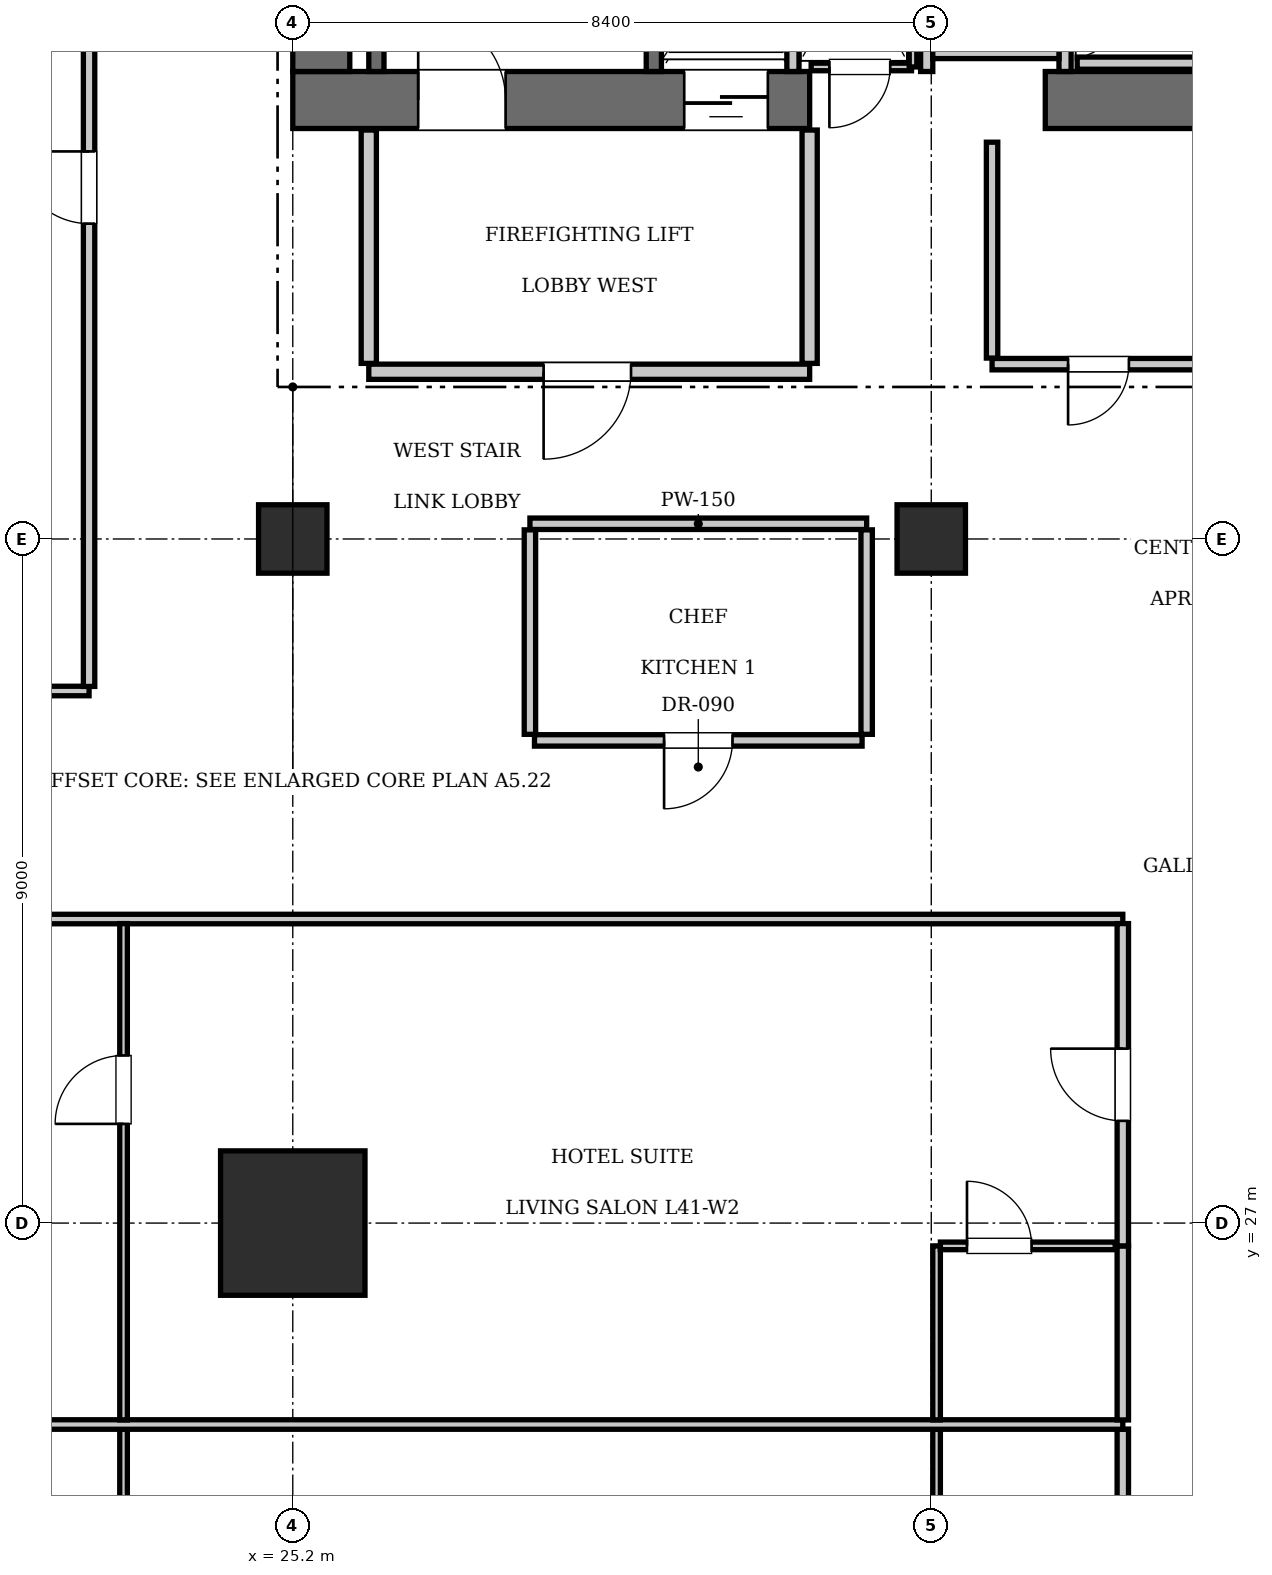
"""IFC4 building model, lengths in metres.
Left out: names, types, materials, properties, quantities, classifications, styles, units other than length and angle.
Written with IfcOpenShell. Run it as: python <this file> out.ifc"""

import sys

from ifc_helpers import new_model, si_unit, direction, frame, frame_2d, origin, origin_2d, place, context, subcontext, project, spatial, rectangle, extrude, element, fill, save


model = new_model("IFC4")
c1 = context("Model", 3, precision=1e-05, world=origin(), true_north=direction((0.0, 1.0)))
c2 = subcontext(c1, "Body", "Model", "MODEL_VIEW")
j1 = project(units=[si_unit("LENGTHUNIT", "METRE"), si_unit("PLANEANGLEUNIT", "RADIAN")], contexts=[c1])
p1 = place(None, origin())
s1 = spatial("IfcSite", under=j1, at=p1, CompositionType="ELEMENT")
p2 = place(p1, origin())
s2 = spatial("IfcBuilding", under=s1, at=p2, CompositionType="ELEMENT")
p3 = place(p2, frame((0.0, 0.0, 169.75)))
s3 = spatial("IfcBuildingStorey", under=s2, at=p3, CompositionType="ELEMENT", Elevation=169.75)
p4 = place(p3, frame((25.2, 27.0, 0.0), z_axis=(0.0, 0.0, 1.0), x_axis=(1.0, 0.0, 0.0)))
e1 = element("IfcColumn", 1, at=p4, inside=s3, PredefinedType="COLUMN", context=c2, shape_type="SweptSolid", body=[
    extrude(rectangle(XDim=1.9, YDim=1.9, at=origin_2d()), origin(), (0.0, 0.0, 1.0), 3.85),
])
p5 = place(p3, frame((25.2, 41.775, 0.0), z_axis=(0.0, 0.0, 1.0), x_axis=(1.0, 0.0, 0.0)))
e2 = element("IfcWall", 2, at=p5, inside=s3, PredefinedType="SHEAR", context=c2, shape_type="SweptSolid", body=[
    extrude(rectangle(XDim=6.8, YDim=0.75, at=frame_2d((3.4, 0.0))), origin(), (0.0, 0.0, 1.0), 3.85),
])
p6 = place(p5, frame((1.65, 0.0, 0.0)))
e3 = element("IfcOpeningElement", 3, at=p6, cuts=e2, PredefinedType="OPENING", context=c2, shape_type="SweptSolid", body=[
    extrude(rectangle(XDim=1.15, YDim=2.15, at=frame_2d((0.575, 1.075))), frame((0.0, 0.385, 0.0), z_axis=(0.0, -1.0, 0.0), x_axis=(1.0, 0.0, 0.0)), (0.0, 0.0, 1.0), 0.77),
])
p7 = place(p5, frame((5.15, 0.0, 0.0)))
e4 = element("IfcOpeningElement", 4, at=p7, cuts=e2, PredefinedType="OPENING", context=c2, shape_type="SweptSolid", body=[
    extrude(rectangle(XDim=1.1, YDim=2.2, at=frame_2d((0.55, 1.1))), frame((0.0, 0.385, 0.0), z_axis=(0.0, -1.0, 0.0), x_axis=(1.0, 0.0, 0.0)), (0.0, 0.0, 1.0), 0.77),
])
p8 = place(p3, frame((35.1, 41.775, 0.0), z_axis=(0.0, 0.0, 1.0), x_axis=(1.0, 0.0, 0.0)))
e5 = element("IfcWall", 5, at=p8, inside=s3, PredefinedType="SHEAR", context=c2, shape_type="SweptSolid", body=[
    extrude(rectangle(XDim=5.4, YDim=0.75, at=frame_2d((2.7, 0.0))), origin(), (0.0, 0.0, 1.0), 3.85),
])
p9 = place(p3, frame((25.575, 42.15, 0.0), z_axis=(0.0, 0.0, 1.0), x_axis=(0.0, 1.0, 0.0)))
e6 = element("IfcWall", 6, at=p9, inside=s3, PredefinedType="SHEAR", context=c2, shape_type="SweptSolid", body=[
    extrude(rectangle(XDim=1.9, YDim=0.75, at=frame_2d((0.95, 0.0))), origin(), (0.0, 0.0, 1.0), 3.85),
])
for number, where, z_axis, x_axis in (
    (7, (25.2, 36.0, 0.0), (0.0, 0.0, 1.0), (1.0, 0.0, 0.0)),
    (8, (33.6, 36.0, 0.0), (0.0, 0.0, 1.0), (1.0, 0.0, 0.0)),
):
    element("IfcColumn", number, at=place(p3, frame(where, z_axis=z_axis, x_axis=x_axis)), inside=s3, PredefinedType="COLUMN", context=c2, shape_type="SweptSolid", body=[
        extrude(rectangle(XDim=0.9, YDim=0.9, at=origin_2d()), origin(), (0.0, 0.0, 1.0), 3.85),
    ])
p10 = place(p3, frame((29.95, 42.15, 0.0), z_axis=(0.0, 0.0, 1.0), x_axis=(0.0, 1.0, 0.0)))
e9 = element("IfcWall", 9, at=p10, inside=s3, PredefinedType="SOLIDWALL", context=c2, shape_type="SweptSolid", body=[
    extrude(rectangle(XDim=9.0, YDim=0.2, at=frame_2d((4.5, 0.0))), origin(), (0.0, 0.0, 1.0), 3.61),
])
p11 = place(p3, frame((26.3, 42.15, 0.0), z_axis=(0.0, 0.0, 1.0), x_axis=(0.0, 1.0, 0.0)))
e10 = element("IfcWall", 10, at=p11, inside=s3, PredefinedType="SOLIDWALL", context=c2, shape_type="SweptSolid", body=[
    extrude(rectangle(XDim=1.87, YDim=0.2, at=frame_2d((0.935, 0.0))), origin(), (0.0, 0.0, 1.0), 3.61),
])
p12 = place(p3, frame((31.78, 42.15, 0.0), z_axis=(0.0, 0.0, 1.0), x_axis=(0.0, 1.0, 0.0)))
e11 = element("IfcWall", 11, at=p12, inside=s3, PredefinedType="SOLIDWALL", context=c2, shape_type="SweptSolid", body=[
    extrude(rectangle(XDim=2.59, YDim=0.16, at=frame_2d((1.295, 0.0))), origin(), (0.0, 0.0, 1.0), 3.61),
])
p13 = place(p3, frame((35.52, 42.26, 0.0), z_axis=(0.0, 0.0, 1.0), x_axis=(1.0, 0.0, 0.0)))
e12 = element("IfcWall", 12, at=p13, inside=s3, PredefinedType="SOLIDWALL", context=c2, shape_type="SweptSolid", body=[
    extrude(rectangle(XDim=5.02, YDim=0.16, at=frame_2d((2.51, 0.0))), origin(), (0.0, 0.0, 1.0), 3.61),
])
for number, where, z_axis, x_axis in (
    (13, (33.54, 42.15, 0.0), (0.0, 0.0, 1.0), (0.0, 1.0, 0.0)),
    (14, (35.36, 42.15, 0.0), (0.0, 0.0, 1.0), (0.0, 1.0, 0.0)),
):
    element("IfcWall", number, at=place(p3, frame(where, z_axis=z_axis, x_axis=x_axis)), inside=s3, PredefinedType="SOLIDWALL", context=c2, shape_type="SweptSolid", body=[
        extrude(rectangle(XDim=2.25, YDim=0.16, at=frame_2d((1.125, 0.0))), origin(), (0.0, 0.0, 1.0), 3.61),
    ])
p14 = place(p3, frame((33.62, 42.4, 0.0), z_axis=(0.0, 0.0, 1.0), x_axis=(1.0, 0.0, 0.0)))
e15 = element("IfcWall", 15, at=p14, inside=s3, PredefinedType="SOLIDWALL", context=c2, shape_type="SweptSolid", body=[
    extrude(rectangle(XDim=1.66, YDim=0.16, at=frame_2d((0.83, 0.0))), origin(), (0.0, 0.0, 1.0), 3.61),
])
p15 = place(p3, frame((26.2, 38.2, 0.0), z_axis=(0.0, 0.0, 1.0), x_axis=(1.0, 0.0, 0.0)))
e16 = element("IfcWall", 16, at=p15, inside=s3, PredefinedType="PARTITIONING", context=c2, shape_type="SweptSolid", body=[
    extrude(rectangle(XDim=5.8, YDim=0.2, at=frame_2d((2.9, 0.0))), origin(), (0.0, 0.0, 1.0), 3.61),
])
p16 = place(p15, frame((2.3, 0.0, 0.0)))
e17 = element("IfcOpeningElement", 17, at=p16, cuts=e16, PredefinedType="OPENING", context=c2, shape_type="SweptSolid", body=[
    extrude(rectangle(XDim=1.15, YDim=2.15, at=frame_2d((0.575, 1.075))), frame((0.0, 0.11, 0.0), z_axis=(0.0, -1.0, 0.0), x_axis=(1.0, 0.0, 0.0)), (0.0, 0.0, 1.0), 0.22),
])
for number, where, z_axis, x_axis in (
    (18, (26.2, 38.31, 0.0), (0.0, 0.0, 1.0), (0.0, 1.0, 0.0)),
    (19, (32.0, 38.31, 0.0), (0.0, 0.0, 1.0), (0.0, 1.0, 0.0)),
):
    element("IfcWall", number, at=place(p3, frame(where, z_axis=z_axis, x_axis=x_axis)), inside=s3, PredefinedType="PARTITIONING", context=c2, shape_type="SweptSolid", body=[
        extrude(rectangle(XDim=3.07, YDim=0.2, at=frame_2d((1.535, 0.0))), origin(), (0.0, 0.0, 1.0), 3.61),
    ])
p17 = place(p3, frame((32.02, 42.21, 0.0), z_axis=(0.0, 0.0, 1.0), x_axis=(1.0, 0.0, 0.0)))
e20 = element("IfcWall", 20, at=p17, inside=s3, PredefinedType="PARTITIONING", context=c2, shape_type="SweptSolid", body=[
    extrude(rectangle(XDim=1.32, YDim=0.1, at=frame_2d((0.66, 0.0))), origin(), (0.0, 0.0, 1.0), 3.61),
])
p18 = place(p17, frame((0.24, 0.0, 0.0)))
e21 = element("IfcOpeningElement", 21, at=p18, cuts=e20, PredefinedType="OPENING", context=c2, shape_type="SweptSolid", body=[
    extrude(rectangle(XDim=0.8, YDim=2.05, at=frame_2d((0.4, 1.025))), frame((0.0, 0.06, 0.0), z_axis=(0.0, -1.0, 0.0), x_axis=(1.0, 0.0, 0.0)), (0.0, 0.0, 1.0), 0.12),
])
p19 = place(p3, frame((33.36, 42.21, 0.0), z_axis=(0.0, 0.0, 1.0), x_axis=(0.0, 1.0, 0.0)))
e22 = element("IfcWall", 22, at=p19, inside=s3, PredefinedType="PARTITIONING", context=c2, shape_type="SweptSolid", body=[
    extrude(rectangle(XDim=2.73, YDim=0.1, at=frame_2d((1.365, 0.0))), origin(), (0.0, 0.0, 1.0), 3.61),
])
p20 = place(p3, frame((34.4, 38.3, 0.0), z_axis=(0.0, 0.0, 1.0), x_axis=(1.0, 0.0, 0.0)))
e23 = element("IfcWall", 23, at=p20, inside=s3, PredefinedType="PARTITIONING", context=c2, shape_type="SweptSolid", body=[
    extrude(rectangle(XDim=2.88, YDim=0.15, at=frame_2d((1.44, 0.0))), origin(), (0.0, 0.0, 1.0), 3.61),
])
p21 = place(p20, frame((1.0, 0.0, 0.0)))
e24 = element("IfcOpeningElement", 24, at=p21, cuts=e23, PredefinedType="OPENING", context=c2, shape_type="SweptSolid", body=[
    extrude(rectangle(XDim=0.8, YDim=2.05, at=frame_2d((0.4, 1.025))), frame((0.0, 0.085, 0.0), z_axis=(0.0, -1.0, 0.0), x_axis=(1.0, 0.0, 0.0)), (0.0, 0.0, 1.0), 0.17),
])
p22 = place(p3, frame((34.4, 38.38, 0.0), z_axis=(0.0, 0.0, 1.0), x_axis=(0.0, 1.0, 0.0)))
e25 = element("IfcWall", 25, at=p22, inside=s3, PredefinedType="PARTITIONING", context=c2, shape_type="SweptSolid", body=[
    extrude(rectangle(XDim=2.84, YDim=0.15, at=frame_2d((1.42, 0.0))), origin(), (0.0, 0.0, 1.0), 3.61),
])
p23 = place(p3, frame((28.32, 36.2, 0.0), z_axis=(0.0, 0.0, 1.0), x_axis=(1.0, 0.0, 0.0)))
e26 = element("IfcWall", 26, at=p23, inside=s3, PredefinedType="PARTITIONING", context=c2, shape_type="SweptSolid", body=[
    extrude(rectangle(XDim=4.43, YDim=0.15, at=frame_2d((2.215, 0.0))), origin(), (0.0, 0.0, 1.0), 3.61),
])
for number, where, z_axis, x_axis in (
    (27, (28.32, 33.43, 0.0), (0.0, 0.0, 1.0), (0.0, 1.0, 0.0)),
    (28, (32.75, 33.43, 0.0), (0.0, 0.0, 1.0), (0.0, 1.0, 0.0)),
):
    element("IfcWall", number, at=place(p3, frame(where, z_axis=z_axis, x_axis=x_axis)), inside=s3, PredefinedType="PARTITIONING", context=c2, shape_type="SweptSolid", body=[
        extrude(rectangle(XDim=2.69, YDim=0.15, at=frame_2d((1.345, 0.0))), origin(), (0.0, 0.0, 1.0), 3.61),
    ])
p24 = place(p3, frame((28.38, 33.35, 0.0), z_axis=(0.0, 0.0, 1.0), x_axis=(1.0, 0.0, 0.0)))
e29 = element("IfcWall", 29, at=p24, inside=s3, PredefinedType="PARTITIONING", context=c2, shape_type="SweptSolid", body=[
    extrude(rectangle(XDim=4.31, YDim=0.15, at=frame_2d((2.155, 0.0))), origin(), (0.0, 0.0, 1.0), 3.61),
])
p25 = place(p24, frame((1.705, 0.0, 0.0)))
e30 = element("IfcOpeningElement", 30, at=p25, cuts=e29, PredefinedType="OPENING", context=c2, shape_type="SweptSolid", body=[
    extrude(rectangle(XDim=0.9, YDim=2.1, at=frame_2d((0.45, 1.05))), frame((0.0, 0.085, 0.0), z_axis=(0.0, -1.0, 0.0), x_axis=(1.0, 0.0, 0.0)), (0.0, 0.0, 1.0), 0.17),
])
p26 = place(p3, frame((13.2, 31.0, 0.0), z_axis=(0.0, 0.0, 1.0), x_axis=(1.0, 0.0, 0.0)))
e31 = element("IfcWall", 31, at=p26, inside=s3, PredefinedType="PARTITIONING", context=c2, shape_type="SweptSolid", body=[
    extrude(rectangle(XDim=22.92, YDim=0.125, at=frame_2d((11.46, 0.0))), origin(), (0.0, 0.0, 1.0), 3.61),
])
p27 = place(p3, frame((36.12, 22.0, 0.0), z_axis=(0.0, 0.0, 1.0), x_axis=(0.0, 1.0, 0.0)))
e32 = element("IfcWall", 32, at=p27, inside=s3, PredefinedType="PARTITIONING", context=c2, shape_type="SweptSolid", body=[
    extrude(rectangle(XDim=2.29, YDim=0.15, at=frame_2d((1.145, 0.0))), origin(), (0.0, 0.0, 1.0), 3.61),
])
p28 = place(p3, frame((33.67, 22.0, 0.0), z_axis=(0.0, 0.0, 1.0), x_axis=(0.0, 1.0, 0.0)))
e33 = element("IfcWall", 33, at=p28, inside=s3, PredefinedType="PARTITIONING", context=c2, shape_type="SweptSolid", body=[
    extrude(rectangle(XDim=2.29, YDim=0.1, at=frame_2d((1.145, 0.0))), origin(), (0.0, 0.0, 1.0), 3.007),
])
p29 = place(p3, frame((22.974, 17.76, 0.0), z_axis=(0.0, 0.0, 1.0), x_axis=(0.0, 1.0, 0.0)))
e34 = element("IfcWall", 34, at=p29, inside=s3, PredefinedType="PARTITIONING", context=c2, shape_type="SweptSolid", body=[
    extrude(rectangle(XDim=6.53, YDim=0.1, at=frame_2d((3.265, 0.0))), origin(), (0.0, 0.0, 1.0), 3.61),
])
p30 = place(p29, frame((2.815, 0.0, 0.0)))
e35 = element("IfcOpeningElement", 35, at=p30, cuts=e34, PredefinedType="OPENING", context=c2, shape_type="SweptSolid", body=[
    extrude(rectangle(XDim=0.9, YDim=2.1, at=frame_2d((0.45, 1.05))), frame((0.0, 0.06, 0.0), z_axis=(0.0, -1.0, 0.0), x_axis=(1.0, 0.0, 0.0)), (0.0, 0.0, 1.0), 0.12),
])
p31 = place(p3, frame((13.2, 24.35, 0.0), z_axis=(0.0, 0.0, 1.0), x_axis=(1.0, 0.0, 0.0)))
e36 = element("IfcWall", 36, at=p31, inside=s3, PredefinedType="PARTITIONING", context=c2, shape_type="SweptSolid", body=[
    extrude(rectangle(XDim=22.92, YDim=0.125, at=frame_2d((11.46, 0.0))), origin(), (0.0, 0.0, 1.0), 3.61),
])
p32 = place(p3, frame((36.12, 24.41, 0.0), z_axis=(0.0, 0.0, 1.0), x_axis=(0.0, 1.0, 0.0)))
e37 = element("IfcWall", 37, at=p32, inside=s3, PredefinedType="PARTITIONING", context=c2, shape_type="SweptSolid", body=[
    extrude(rectangle(XDim=2.29, YDim=0.15, at=frame_2d((1.145, 0.0))), origin(), (0.0, 0.0, 1.0), 3.61),
])
p33 = place(p3, frame((36.12, 26.7, 0.0), z_axis=(0.0, 0.0, 1.0), x_axis=(0.0, 1.0, 0.0)))
e38 = element("IfcWall", 38, at=p33, inside=s3, PredefinedType="PARTITIONING", context=c2, shape_type="SweptSolid", body=[
    extrude(rectangle(XDim=4.24, YDim=0.15, at=frame_2d((2.12, 0.0))), origin(), (0.0, 0.0, 1.0), 3.61),
])
p34 = place(p33, frame((1.645, 0.0, 0.0)))
e39 = element("IfcOpeningElement", 39, at=p34, cuts=e38, PredefinedType="OPENING", context=c2, shape_type="SweptSolid", body=[
    extrude(rectangle(XDim=0.95, YDim=2.15, at=frame_2d((0.475, 1.075))), frame((0.0, 0.085, 0.0), z_axis=(0.0, -1.0, 0.0), x_axis=(1.0, 0.0, 0.0)), (0.0, 0.0, 1.0), 0.17),
])
p35 = place(p3, frame((33.67, 24.41, 0.0), z_axis=(0.0, 0.0, 1.0), x_axis=(0.0, 1.0, 0.0)))
e40 = element("IfcWall", 40, at=p35, inside=s3, PredefinedType="PARTITIONING", context=c2, shape_type="SweptSolid", body=[
    extrude(rectangle(XDim=2.29, YDim=0.1, at=frame_2d((1.145, 0.0))), origin(), (0.0, 0.0, 1.0), 3.007),
])
p36 = place(p3, frame((33.72, 26.7, 0.0), z_axis=(0.0, 0.0, 1.0), x_axis=(1.0, 0.0, 0.0)))
e41 = element("IfcWall", 41, at=p36, inside=s3, PredefinedType="PARTITIONING", context=c2, shape_type="SweptSolid", body=[
    extrude(rectangle(XDim=2.3, YDim=0.1, at=frame_2d((1.15, 0.0))), origin(), (0.0, 0.0, 1.0), 3.61),
])
p37 = place(p36, frame((0.35, 0.0, 0.0)))
e42 = element("IfcOpeningElement", 42, at=p37, cuts=e41, PredefinedType="OPENING", context=c2, shape_type="SweptSolid", body=[
    extrude(rectangle(XDim=0.85, YDim=2.1, at=frame_2d((0.425, 1.05))), frame((0.0, 0.06, 0.0), z_axis=(0.0, -1.0, 0.0), x_axis=(1.0, 0.0, 0.0)), (0.0, 0.0, 1.0), 0.12),
])
p38 = place(p3, frame((22.974, 24.41, 0.0), z_axis=(0.0, 0.0, 1.0), x_axis=(0.0, 1.0, 0.0)))
e43 = element("IfcWall", 43, at=p38, inside=s3, PredefinedType="PARTITIONING", context=c2, shape_type="SweptSolid", body=[
    extrude(rectangle(XDim=6.53, YDim=0.1, at=frame_2d((3.265, 0.0))), origin(), (0.0, 0.0, 1.0), 3.61),
])
p39 = place(p38, frame((3.895, 0.0, 0.0)))
e44 = element("IfcOpeningElement", 44, at=p39, cuts=e43, PredefinedType="OPENING", context=c2, shape_type="SweptSolid", body=[
    extrude(rectangle(XDim=0.9, YDim=2.1, at=frame_2d((0.45, 1.05))), frame((0.0, 0.06, 0.0), z_axis=(0.0, -1.0, 0.0), x_axis=(1.0, 0.0, 0.0)), (0.0, 0.0, 1.0), 0.12),
])
p40 = place(p3, frame((13.2, 34.0, 0.0), z_axis=(0.0, 0.0, 1.0), x_axis=(1.0, 0.0, 0.0)))
e45 = element("IfcWall", 45, at=p40, inside=s3, PredefinedType="PARTITIONING", context=c2, shape_type="SweptSolid", body=[
    extrude(rectangle(XDim=9.32, YDim=0.125, at=frame_2d((4.66, 0.0))), origin(), (0.0, 0.0, 1.0), 3.61),
])
p41 = place(p3, frame((22.52, 34.06, 0.0), z_axis=(0.0, 0.0, 1.0), x_axis=(0.0, 1.0, 0.0)))
e46 = element("IfcWall", 46, at=p41, inside=s3, PredefinedType="PARTITIONING", context=c2, shape_type="SweptSolid", body=[
    extrude(rectangle(XDim=13.127, YDim=0.15, at=frame_2d((6.564, 0.0))), origin(), (0.0, 0.0, 1.0), 3.61),
])
p42 = place(p41, frame((6.089, 0.0, 0.0)))
e47 = element("IfcOpeningElement", 47, at=p42, cuts=e46, PredefinedType="OPENING", context=c2, shape_type="SweptSolid", body=[
    extrude(rectangle(XDim=0.95, YDim=2.15, at=frame_2d((0.475, 1.075))), frame((0.0, 0.085, 0.0), z_axis=(0.0, -1.0, 0.0), x_axis=(1.0, 0.0, 0.0)), (0.0, 0.0, 1.0), 0.17),
])
p43 = place(p6, origin())
e48 = element("IfcDoor", 48, at=p43, inside=s3, OperationType="SINGLE_SWING_LEFT", PredefinedType="DOOR", context=c2, shape_type="SweptSolid", body=[
    extrude(rectangle(XDim=1.15, YDim=2.15, at=frame_2d((0.575, 1.075))), frame((0.0, 0.025, 0.0), z_axis=(0.0, -1.0, 0.0), x_axis=(1.0, 0.0, 0.0)), (0.0, 0.0, 1.0), 0.05),
])
fill(e3, e48)
p44 = place(p7, frame((1.1, 0.0, 0.0), z_axis=(0.0, 0.0, 1.0), x_axis=(-1.0, 0.0, 0.0)))
e49 = element("IfcDoor", 49, at=p44, inside=s3, OperationType="SLIDING_TO_LEFT", PredefinedType="DOOR", context=c2, shape_type="SweptSolid", body=[
    extrude(rectangle(XDim=1.1, YDim=2.2, at=frame_2d((0.55, 1.1))), frame((0.0, 0.025, 0.0), z_axis=(0.0, -1.0, 0.0), x_axis=(1.0, 0.0, 0.0)), (0.0, 0.0, 1.0), 0.05),
])
fill(e4, e49)
p45 = place(p16, frame((1.15, 0.0, 0.0), z_axis=(0.0, 0.0, 1.0), x_axis=(-1.0, 0.0, 0.0)))
e50 = element("IfcDoor", 50, at=p45, inside=s3, OperationType="SINGLE_SWING_RIGHT", PredefinedType="DOOR", context=c2, shape_type="SweptSolid", body=[
    extrude(rectangle(XDim=1.15, YDim=2.15, at=frame_2d((0.575, 1.075))), frame((0.0, 0.025, 0.0), z_axis=(0.0, -1.0, 0.0), x_axis=(1.0, 0.0, 0.0)), (0.0, 0.0, 1.0), 0.05),
])
fill(e17, e50)
p46 = place(p18, frame((0.8, 0.0, 0.0), z_axis=(0.0, 0.0, 1.0), x_axis=(-1.0, 0.0, 0.0)))
e51 = element("IfcDoor", 51, at=p46, inside=s3, OperationType="SINGLE_SWING_RIGHT", PredefinedType="DOOR", context=c2, shape_type="SweptSolid", body=[
    extrude(rectangle(XDim=0.8, YDim=2.05, at=frame_2d((0.4, 1.025))), frame((0.0, 0.025, 0.0), z_axis=(0.0, -1.0, 0.0), x_axis=(1.0, 0.0, 0.0)), (0.0, 0.0, 1.0), 0.05),
])
fill(e21, e51)
p47 = place(p21, frame((0.8, 0.0, 0.0), z_axis=(0.0, 0.0, 1.0), x_axis=(-1.0, 0.0, 0.0)))
e52 = element("IfcDoor", 52, at=p47, inside=s3, OperationType="SINGLE_SWING_RIGHT", PredefinedType="DOOR", context=c2, shape_type="SweptSolid", body=[
    extrude(rectangle(XDim=0.8, YDim=2.05, at=frame_2d((0.4, 1.025))), frame((0.0, 0.025, 0.0), z_axis=(0.0, -1.0, 0.0), x_axis=(1.0, 0.0, 0.0)), (0.0, 0.0, 1.0), 0.05),
])
fill(e24, e52)
p48 = place(p25, frame((0.9, 0.0, 0.0), z_axis=(0.0, 0.0, 1.0), x_axis=(-1.0, 0.0, 0.0)))
e53 = element("IfcDoor", 53, at=p48, inside=s3, OperationType="SINGLE_SWING_RIGHT", PredefinedType="DOOR", context=c2, shape_type="SweptSolid", body=[
    extrude(rectangle(XDim=0.9, YDim=2.1, at=frame_2d((0.45, 1.05))), frame((0.0, 0.025, 0.0), z_axis=(0.0, -1.0, 0.0), x_axis=(1.0, 0.0, 0.0)), (0.0, 0.0, 1.0), 0.05),
])
fill(e30, e53)
p49 = place(p37, origin())
e54 = element("IfcDoor", 54, at=p49, inside=s3, OperationType="SINGLE_SWING_LEFT", PredefinedType="DOOR", context=c2, shape_type="SweptSolid", body=[
    extrude(rectangle(XDim=0.85, YDim=2.1, at=frame_2d((0.425, 1.05))), frame((0.0, 0.025, 0.0), z_axis=(0.0, -1.0, 0.0), x_axis=(1.0, 0.0, 0.0)), (0.0, 0.0, 1.0), 0.05),
])
fill(e42, e54)
p50 = place(p34, origin())
e55 = element("IfcDoor", 55, at=p50, inside=s3, OperationType="SINGLE_SWING_RIGHT", PredefinedType="DOOR", context=c2, shape_type="SweptSolid", body=[
    extrude(rectangle(XDim=0.95, YDim=2.15, at=frame_2d((0.475, 1.075))), frame((0.0, 0.025, 0.0), z_axis=(0.0, -1.0, 0.0), x_axis=(1.0, 0.0, 0.0)), (0.0, 0.0, 1.0), 0.05),
])
fill(e39, e55)
p51 = place(p39, origin())
e56 = element("IfcDoor", 56, at=p51, inside=s3, OperationType="SINGLE_SWING_LEFT", PredefinedType="DOOR", context=c2, shape_type="SweptSolid", body=[
    extrude(rectangle(XDim=0.9, YDim=2.1, at=frame_2d((0.45, 1.05))), frame((0.0, 0.025, 0.0), z_axis=(0.0, -1.0, 0.0), x_axis=(1.0, 0.0, 0.0)), (0.0, 0.0, 1.0), 0.05),
])
fill(e44, e56)
p52 = place(p42, origin())
e57 = element("IfcDoor", 57, at=p52, inside=s3, OperationType="SINGLE_SWING_RIGHT", PredefinedType="DOOR", context=c2, shape_type="SweptSolid", body=[
    extrude(rectangle(XDim=0.95, YDim=2.15, at=frame_2d((0.475, 1.075))), frame((0.0, 0.025, 0.0), z_axis=(0.0, -1.0, 0.0), x_axis=(1.0, 0.0, 0.0)), (0.0, 0.0, 1.0), 0.05),
])
fill(e47, e57)
save(model, sys.argv[1])
